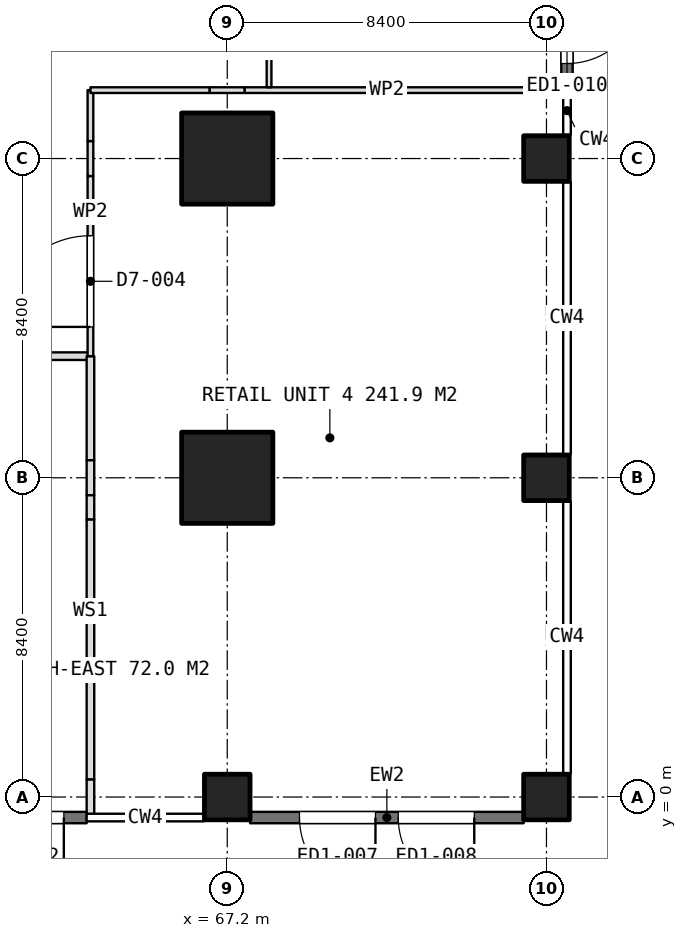
"""IFC4 building model, lengths in metres.
Left out: names, types, materials, properties, quantities, classifications, styles, units other than length and angle.
Written with IfcOpenShell. Run it as: python <this file> out.ifc"""

import sys

from ifc_helpers import new_model, si_unit, direction, frame, frame_2d, origin, origin_2d, place, context, subcontext, project, spatial, rectangle, extrude, element, fill, save


model = new_model("IFC4")
c1 = context("Model", 3, precision=1e-05, world=origin(), true_north=direction((0.0, 1.0)))
c2 = subcontext(c1, "Body", "Model", "MODEL_VIEW")
j1 = project(units=[si_unit("LENGTHUNIT", "METRE"), si_unit("PLANEANGLEUNIT", "RADIAN")], contexts=[c1])
p1 = place(None, origin())
s1 = spatial("IfcSite", under=j1, at=p1, CompositionType="ELEMENT")
p2 = place(p1, origin())
s2 = spatial("IfcBuilding", under=s1, at=p2, CompositionType="ELEMENT")
p3 = place(p2, origin())
s3 = spatial("IfcBuildingStorey", under=s2, at=p3, CompositionType="ELEMENT", Elevation=0.0)
p4 = place(p3, frame((67.2, 0.0, 0.0), z_axis=(0.0, 0.0, 1.0), x_axis=(1.0, 0.0, 0.0)))
e1 = element("IfcColumn", 1, at=p4, inside=s3, PredefinedType="COLUMN", context=c2, shape_type="SweptSolid", body=[
    extrude(rectangle(XDim=1.2, YDim=1.2, at=origin_2d()), origin(), (0.0, 0.0, 1.0), 5.4),
])
for number, where, z_axis, x_axis in (
    (2, (67.2, 8.4, 0.0), (0.0, 0.0, 1.0), (1.0, 0.0, 0.0)),
    (3, (67.2, 16.8, 0.0), (0.0, 0.0, 1.0), (1.0, 0.0, 0.0)),
):
    element("IfcColumn", number, at=place(p3, frame(where, z_axis=z_axis, x_axis=x_axis)), inside=s3, PredefinedType="COLUMN", context=c2, shape_type="SweptSolid", body=[
        extrude(rectangle(XDim=2.4, YDim=2.4, at=origin_2d()), origin(), (0.0, 0.0, 1.0), 5.4),
    ])
for number, where, z_axis, x_axis in (
    (4, (75.6, 0.0, 0.0), (0.0, 0.0, 1.0), (1.0, 0.0, 0.0)),
    (5, (75.6, 8.4, 0.0), (0.0, 0.0, 1.0), (1.0, 0.0, 0.0)),
    (6, (75.6, 16.8, 0.0), (0.0, 0.0, 1.0), (1.0, 0.0, 0.0)),
):
    element("IfcColumn", number, at=place(p3, frame(where, z_axis=z_axis, x_axis=x_axis)), inside=s3, PredefinedType="COLUMN", context=c2, shape_type="SweptSolid", body=[
        extrude(rectangle(XDim=1.2, YDim=1.2, at=origin_2d()), origin(), (0.0, 0.0, 1.0), 5.4),
    ])
p5 = place(p3, frame((63.5, -0.54, 0.0), z_axis=(0.0, 0.0, 1.0), x_axis=(-1.0, 0.0, 0.0)))
e7 = element("IfcWall", 7, at=p5, inside=s3, PredefinedType="SOLIDWALL", context=c2, shape_type="SweptSolid", body=[
    extrude(rectangle(XDim=4.099, YDim=0.3, at=frame_2d((2.05, 0.0))), origin(), (0.0, 0.0, 1.0), 3.3),
])
p6 = place(p5, frame((0.6, 0.0, 0.0)))
e8 = element("IfcOpeningElement", 8, at=p6, cuts=e7, PredefinedType="OPENING", context=c2, shape_type="SweptSolid", body=[
    extrude(rectangle(XDim=2.4, YDim=2.4, at=frame_2d((1.2, 1.2))), frame((0.0, 0.16, 0.0), z_axis=(0.0, -1.0, 0.0), x_axis=(1.0, 0.0, 0.0)), (0.0, 0.0, 1.0), 0.32),
])
p7 = place(p3, frame((74.999, -0.54, 0.0), z_axis=(0.0, 0.0, 1.0), x_axis=(-1.0, 0.0, 0.0)))
e9 = element("IfcWall", 9, at=p7, inside=s3, PredefinedType="SOLIDWALL", context=c2, shape_type="SweptSolid", body=[
    extrude(rectangle(XDim=7.198, YDim=0.3, at=frame_2d((3.599, 0.0))), origin(), (0.0, 0.0, 1.0), 3.3),
])
p8 = place(p7, frame((3.899, 0.0, 0.0)))
e10 = element("IfcOpeningElement", 10, at=p8, cuts=e9, PredefinedType="OPENING", context=c2, shape_type="SweptSolid", body=[
    extrude(rectangle(XDim=2.0, YDim=2.7, at=frame_2d((1.0, 1.35))), frame((0.0, 0.16, 0.0), z_axis=(0.0, -1.0, 0.0), x_axis=(1.0, 0.0, 0.0)), (0.0, 0.0, 1.0), 0.32),
])
p9 = place(p7, frame((1.299, 0.0, 0.0)))
e11 = element("IfcOpeningElement", 11, at=p9, cuts=e9, PredefinedType="OPENING", context=c2, shape_type="SweptSolid", body=[
    extrude(rectangle(XDim=2.0, YDim=2.7, at=frame_2d((1.0, 1.35))), frame((0.0, 0.16, 0.0), z_axis=(0.0, -1.0, 0.0), x_axis=(1.0, 0.0, 0.0)), (0.0, 0.0, 1.0), 0.32),
])
p10 = place(p3, frame((76.14, 24.599, 0.0), z_axis=(0.0, 0.0, 1.0), x_axis=(0.0, -1.0, 0.0)))
e12 = element("IfcWall", 12, at=p10, inside=s3, PredefinedType="SOLIDWALL", context=c2, shape_type="SweptSolid", body=[
    extrude(rectangle(XDim=5.899, YDim=0.3, at=frame_2d((2.95, 0.0))), origin(), (0.0, 0.0, 1.0), 3.3),
])
p11 = place(p10, frame((3.299, 0.0, 0.0)))
e13 = element("IfcOpeningElement", 13, at=p11, cuts=e12, PredefinedType="OPENING", context=c2, shape_type="SweptSolid", body=[
    extrude(rectangle(XDim=2.0, YDim=2.7, at=frame_2d((1.0, 1.35))), frame((0.0, 0.16, 0.0), z_axis=(0.0, -1.0, 0.0), x_axis=(1.0, 0.0, 0.0)), (0.0, 0.0, 1.0), 0.32),
])
p12 = place(p10, frame((0.699, 0.0, 0.0)))
e14 = element("IfcOpeningElement", 14, at=p12, cuts=e12, PredefinedType="OPENING", context=c2, shape_type="SweptSolid", body=[
    extrude(rectangle(XDim=2.0, YDim=2.7, at=frame_2d((1.0, 1.35))), frame((0.0, 0.16, 0.0), z_axis=(0.0, -1.0, 0.0), x_axis=(1.0, 0.0, 0.0)), (0.0, 0.0, 1.0), 0.32),
])
p13 = place(p3, frame((60.4, 11.6, 0.0), z_axis=(0.0, 0.0, 1.0), x_axis=(1.0, 0.0, 0.0)))
e15 = element("IfcWall", 15, at=p13, inside=s3, PredefinedType="PARTITIONING", context=c2, shape_type="SweptSolid", body=[
    extrude(rectangle(XDim=3.2, YDim=0.2, at=frame_2d((1.6, 0.0))), origin(), (0.0, 0.0, 1.0), 5.1),
])
p14 = place(p3, frame((63.6, 11.6, 0.0), z_axis=(0.0, 0.0, 1.0), x_axis=(0.0, -1.0, 0.0)))
e16 = element("IfcWall", 16, at=p14, inside=s3, PredefinedType="PARTITIONING", context=c2, shape_type="SweptSolid", body=[
    extrude(rectangle(XDim=2.74, YDim=0.2, at=frame_2d((1.37, 0.0))), origin(), (0.0, 0.0, 1.0), 5.1),
])
p15 = place(p3, frame((63.6, 8.86, 0.0), z_axis=(0.0, 0.0, 1.0), x_axis=(0.0, -1.0, 0.0)))
e17 = element("IfcWall", 17, at=p15, inside=s3, PredefinedType="PARTITIONING", context=c2, shape_type="SweptSolid", body=[
    extrude(rectangle(XDim=0.92, YDim=0.2, at=frame_2d((0.46, 0.0))), origin(), (0.0, 0.0, 1.0), 3.3),
])
p16 = place(p3, frame((63.6, 7.94, 0.0), z_axis=(0.0, 0.0, 1.0), x_axis=(0.0, -1.0, 0.0)))
e18 = element("IfcWall", 18, at=p16, inside=s3, PredefinedType="PARTITIONING", context=c2, shape_type="SweptSolid", body=[
    extrude(rectangle(XDim=0.64, YDim=0.2, at=frame_2d((0.32, 0.0))), origin(), (0.0, 0.0, 1.0), 5.1),
])
p17 = place(p3, frame((63.6, 7.3, 0.0), z_axis=(0.0, 0.0, 1.0), x_axis=(0.0, -1.0, 0.0)))
e19 = element("IfcWall", 19, at=p17, inside=s3, PredefinedType="PARTITIONING", context=c2, shape_type="SweptSolid", body=[
    extrude(rectangle(XDim=6.84, YDim=0.2, at=frame_2d((3.42, 0.0))), origin(), (0.0, 0.0, 1.0), 5.1),
])
p18 = place(p3, frame((63.6, 0.46, 0.0), z_axis=(0.0, 0.0, 1.0), x_axis=(0.0, -1.0, 0.0)))
e20 = element("IfcWall", 20, at=p18, inside=s3, PredefinedType="PARTITIONING", context=c2, shape_type="SweptSolid", body=[
    extrude(rectangle(XDim=0.91, YDim=0.2, at=frame_2d((0.455, 0.0))), origin(), (0.0, 0.0, 1.0), 3.3),
])
p19 = place(p3, frame((63.6, 11.6, 0.0), z_axis=(0.0, 0.0, 1.0), x_axis=(0.0, 1.0, 0.0)))
e21 = element("IfcWall", 21, at=p19, inside=s3, PredefinedType="PARTITIONING", context=c2, shape_type="SweptSolid", body=[
    extrude(rectangle(XDim=4.74, YDim=0.15, at=frame_2d((2.37, 0.0))), origin(), (0.0, 0.0, 1.0), 5.1),
])
p20 = place(p19, frame((0.77, 0.0, 0.0)))
e22 = element("IfcOpeningElement", 22, at=p20, cuts=e21, PredefinedType="OPENING", context=c2, shape_type="SweptSolid", body=[
    extrude(rectangle(XDim=2.4, YDim=2.4, at=frame_2d((1.2, 1.2))), frame((0.0, 0.085, 0.0), z_axis=(0.0, -1.0, 0.0), x_axis=(1.0, 0.0, 0.0)), (0.0, 0.0, 1.0), 0.17),
])
p21 = place(p3, frame((63.6, 16.34, 0.0), z_axis=(0.0, 0.0, 1.0), x_axis=(0.0, 1.0, 0.0)))
e23 = element("IfcWall", 23, at=p21, inside=s3, PredefinedType="PARTITIONING", context=c2, shape_type="SweptSolid", body=[
    extrude(rectangle(XDim=0.92, YDim=0.15, at=frame_2d((0.46, 0.0))), origin(), (0.0, 0.0, 1.0), 3.3),
])
p22 = place(p3, frame((63.6, 17.26, 0.0), z_axis=(0.0, 0.0, 1.0), x_axis=(0.0, 1.0, 0.0)))
e24 = element("IfcWall", 24, at=p22, inside=s3, PredefinedType="PARTITIONING", context=c2, shape_type="SweptSolid", body=[
    extrude(rectangle(XDim=1.34, YDim=0.15, at=frame_2d((0.67, 0.0))), origin(), (0.0, 0.0, 1.0), 5.1),
])
p23 = place(p3, frame((63.6, 18.6, 0.0), z_axis=(0.0, 0.0, 1.0), x_axis=(1.0, 0.0, 0.0)))
e25 = element("IfcWall", 25, at=p23, inside=s3, PredefinedType="PARTITIONING", context=c2, shape_type="SweptSolid", body=[
    extrude(rectangle(XDim=3.14, YDim=0.15, at=frame_2d((1.57, 0.0))), origin(), (0.0, 0.0, 1.0), 5.1),
])
p24 = place(p3, frame((66.74, 18.6, 0.0), z_axis=(0.0, 0.0, 1.0), x_axis=(1.0, 0.0, 0.0)))
e26 = element("IfcWall", 26, at=p24, inside=s3, PredefinedType="PARTITIONING", context=c2, shape_type="SweptSolid", body=[
    extrude(rectangle(XDim=0.92, YDim=0.15, at=frame_2d((0.46, 0.0))), origin(), (0.0, 0.0, 1.0), 3.3),
])
p25 = place(p3, frame((67.66, 18.6, 0.0), z_axis=(0.0, 0.0, 1.0), x_axis=(1.0, 0.0, 0.0)))
e27 = element("IfcWall", 27, at=p25, inside=s3, PredefinedType="PARTITIONING", context=c2, shape_type="SweptSolid", body=[
    extrude(rectangle(XDim=7.48, YDim=0.15, at=frame_2d((3.74, 0.0))), origin(), (0.0, 0.0, 1.0), 5.1),
])
p26 = place(p3, frame((75.14, 18.6, 0.0), z_axis=(0.0, 0.0, 1.0), x_axis=(1.0, 0.0, 0.0)))
e28 = element("IfcWall", 28, at=p26, inside=s3, PredefinedType="PARTITIONING", context=c2, shape_type="SweptSolid", body=[
    extrude(rectangle(XDim=0.91, YDim=0.15, at=frame_2d((0.455, 0.0))), origin(), (0.0, 0.0, 1.0), 3.3),
])
p27 = place(p3, frame((68.3, 18.675, 0.0), z_axis=(0.0, 0.0, 1.0), x_axis=(0.0, 1.0, 0.0)))
e29 = element("IfcWall", 29, at=p27, inside=s3, PredefinedType="PARTITIONING", context=c2, shape_type="SweptSolid", body=[
    extrude(rectangle(XDim=5.305, YDim=0.125, at=frame_2d((2.652, 0.0))), origin(), (0.0, 0.0, 1.0), 5.1),
])
p28 = place(p27, frame((1.68, 0.0, 0.0)))
e30 = element("IfcOpeningElement", 30, at=p28, cuts=e29, PredefinedType="OPENING", context=c2, shape_type="SweptSolid", body=[
    extrude(rectangle(XDim=1.8, YDim=2.1, at=frame_2d((0.9, 1.05))), frame((0.0, 0.073, 0.0), z_axis=(0.0, -1.0, 0.0), x_axis=(1.0, 0.0, 0.0)), (0.0, 0.0, 1.0), 0.145),
])
p29 = place(p6, origin())
e31 = element("IfcDoor", 31, at=p29, inside=s3, OperationType="DOUBLE_DOOR_SINGLE_SWING", PredefinedType="DOOR", context=c2, shape_type="SweptSolid", body=[
    extrude(rectangle(XDim=2.4, YDim=2.4, at=frame_2d((1.2, 1.2))), frame((0.0, 0.025, 0.0), z_axis=(0.0, -1.0, 0.0), x_axis=(1.0, 0.0, 0.0)), (0.0, 0.0, 1.0), 0.05),
])
fill(e8, e31)
p30 = place(p8, origin())
e32 = element("IfcDoor", 32, at=p30, inside=s3, OperationType="DOUBLE_DOOR_SINGLE_SWING", PredefinedType="DOOR", context=c2, shape_type="SweptSolid", body=[
    extrude(rectangle(XDim=2.0, YDim=2.7, at=frame_2d((1.0, 1.35))), frame((0.0, 0.025, 0.0), z_axis=(0.0, -1.0, 0.0), x_axis=(1.0, 0.0, 0.0)), (0.0, 0.0, 1.0), 0.05),
])
fill(e10, e32)
p31 = place(p9, origin())
e33 = element("IfcDoor", 33, at=p31, inside=s3, OperationType="DOUBLE_DOOR_SINGLE_SWING", PredefinedType="DOOR", context=c2, shape_type="SweptSolid", body=[
    extrude(rectangle(XDim=2.0, YDim=2.7, at=frame_2d((1.0, 1.35))), frame((0.0, 0.025, 0.0), z_axis=(0.0, -1.0, 0.0), x_axis=(1.0, 0.0, 0.0)), (0.0, 0.0, 1.0), 0.05),
])
fill(e11, e33)
p32 = place(p11, origin())
e34 = element("IfcDoor", 34, at=p32, inside=s3, OperationType="DOUBLE_DOOR_SINGLE_SWING", PredefinedType="DOOR", context=c2, shape_type="SweptSolid", body=[
    extrude(rectangle(XDim=2.0, YDim=2.7, at=frame_2d((1.0, 1.35))), frame((0.0, 0.025, 0.0), z_axis=(0.0, -1.0, 0.0), x_axis=(1.0, 0.0, 0.0)), (0.0, 0.0, 1.0), 0.05),
])
fill(e13, e34)
p33 = place(p20, origin())
e35 = element("IfcDoor", 35, at=p33, inside=s3, OperationType="DOUBLE_DOOR_SINGLE_SWING", PredefinedType="DOOR", context=c2, shape_type="SweptSolid", body=[
    extrude(rectangle(XDim=2.4, YDim=2.4, at=frame_2d((1.2, 1.2))), frame((0.0, 0.025, 0.0), z_axis=(0.0, -1.0, 0.0), x_axis=(1.0, 0.0, 0.0)), (0.0, 0.0, 1.0), 0.05),
])
fill(e22, e35)
save(model, sys.argv[1])
